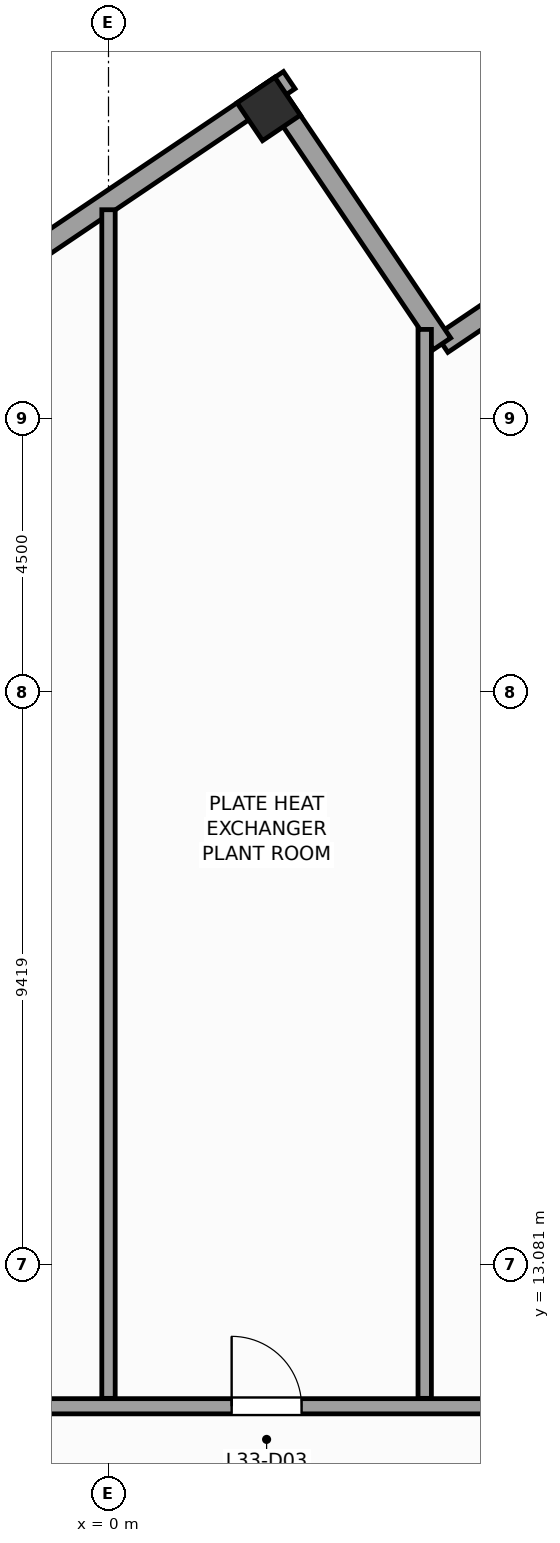
"""IFC4 building model, lengths in metres.
Left out: names, types, materials, properties, quantities, classifications, styles, units other than length and angle.
Written with IfcOpenShell. Run it as: python <this file> out.ifc"""

import sys

from ifc_helpers import new_model, si_unit, direction, frame, frame_2d, origin, origin_2d, place, context, subcontext, project, spatial, rectangle, extrude, source, transform, mapped, element, fill, save


model = new_model("IFC4")
c1 = context("Model", 3, precision=1e-05, world=origin(), true_north=direction((0.0, 1.0)))
c2 = subcontext(c1, "Body", "Model", "MODEL_VIEW")
j1 = project(units=[si_unit("LENGTHUNIT", "METRE"), si_unit("PLANEANGLEUNIT", "RADIAN")], contexts=[c1])
p1 = place(None, origin())
s1 = spatial("IfcSite", under=j1, at=p1, CompositionType="ELEMENT")
p2 = place(p1, origin())
s2 = spatial("IfcBuilding", under=s1, at=p2, CompositionType="ELEMENT")
p3 = place(p2, frame((0.0, 0.0, 139.2)))
s3 = spatial("IfcBuildingStorey", under=s2, at=p3, CompositionType="ELEMENT", Elevation=139.2)
m1 = source(origin(), c2, "Body", "SweptSolid", [
    extrude(rectangle(XDim=0.75, YDim=0.75, at=origin_2d()), origin(), (0.0, 0.0, 1.0), 5.2),
])
p4 = place(p3, frame((2.635, 32.083, 0.0), z_axis=(0.0, 0.0, 1.0), x_axis=(0.829037572555, 0.559192903471, 0.0)))
e1 = element("IfcColumn", 1, at=p4, inside=s3, PredefinedType="COLUMN", context=c2, shape_type="MappedRepresentation", body=[
    mapped(m1, transform((0.0, 0.0, 0.0), scale=1.0)),
])
p5 = place(p3, frame((9.631, 31.019, 0.0), z_axis=(0.0, 0.0, 1.0), x_axis=(-0.829025804298, -0.559210350234, 0.0)))
e2 = element("IfcWall", 2, at=p5, inside=s3, PredefinedType="STANDARD", context=c2, shape_type="SweptSolid", body=[
    extrude(rectangle(XDim=5.0, YDim=0.34, at=frame_2d((2.5, 0.0))), origin(), (0.0, 0.0, 1.0), 4.94),
])
p6 = place(p3, frame((5.486, 28.223, 0.0), z_axis=(0.0, 0.0, 1.0), x_axis=(-0.559171107879, 0.82905227345, 0.0)))
e3 = element("IfcWall", 3, at=p6, inside=s3, PredefinedType="STANDARD", context=c2, shape_type="SweptSolid", body=[
    extrude(rectangle(XDim=5.17, YDim=0.34, at=frame_2d((2.585, 0.0))), origin(), (0.0, 0.0, 1.0), 4.24),
])
p7 = place(p3, frame((2.972, 32.558, 0.0), z_axis=(0.0, 0.0, 1.0), x_axis=(-0.82903231094, -0.559200704056, 0.0)))
e4 = element("IfcWall", 4, at=p7, inside=s3, PredefinedType="STANDARD", context=c2, shape_type="SweptSolid", body=[
    extrude(rectangle(XDim=15.27, YDim=0.34, at=frame_2d((7.635, 0.0))), origin(), (0.0, 0.0, 1.0), 4.34),
])
p8 = place(p7, frame((12.27, 0.0, 0.0)))
e5 = element("IfcOpeningElement", 5, at=p8, cuts=e4, PredefinedType="OPENING", context=c2, shape_type="SweptSolid", body=[
    extrude(rectangle(XDim=1.2, YDim=2.3, at=frame_2d((0.6, 1.15))), frame((0.0, 0.18, 0.0), z_axis=(0.0, -1.0, 0.0), x_axis=(1.0, 0.0, 0.0)), (0.0, 0.0, 1.0), 0.36),
])
p9 = place(p3, frame((-10.75, 10.75, 0.0), z_axis=(0.0, 0.0, 1.0), x_axis=(1.0, 0.0, 0.0)))
e6 = element("IfcWall", 6, at=p9, inside=s3, PredefinedType="PARTITIONING", context=c2, shape_type="SweptSolid", body=[
    extrude(rectangle(XDim=21.5, YDim=0.25, at=frame_2d((10.75, 0.0))), origin(), (0.0, 0.0, 1.0), 4.94),
])
p10 = place(p9, frame((2.365, 0.0, 0.0)))
e7 = element("IfcOpeningElement", 7, at=p10, cuts=e6, PredefinedType="OPENING", context=c2, shape_type="SweptSolid", body=[
    extrude(rectangle(XDim=1.15, YDim=2.25, at=frame_2d((0.575, 1.125))), frame((0.0, 0.135, 0.0), z_axis=(0.0, -1.0, 0.0), x_axis=(1.0, 0.0, 0.0)), (0.0, 0.0, 1.0), 0.27),
])
p11 = place(p9, frame((7.575, 0.0, 0.0)))
e8 = element("IfcOpeningElement", 8, at=p11, cuts=e6, PredefinedType="OPENING", context=c2, shape_type="SweptSolid", body=[
    extrude(rectangle(XDim=1.15, YDim=2.25, at=frame_2d((0.575, 1.125))), frame((0.0, 0.135, 0.0), z_axis=(0.0, -1.0, 0.0), x_axis=(1.0, 0.0, 0.0)), (0.0, 0.0, 1.0), 0.27),
])
p12 = place(p9, frame((12.775, 0.0, 0.0)))
e9 = element("IfcOpeningElement", 9, at=p12, cuts=e6, PredefinedType="OPENING", context=c2, shape_type="SweptSolid", body=[
    extrude(rectangle(XDim=1.15, YDim=2.25, at=frame_2d((0.575, 1.125))), frame((0.0, 0.135, 0.0), z_axis=(0.0, -1.0, 0.0), x_axis=(1.0, 0.0, 0.0)), (0.0, 0.0, 1.0), 0.27),
])
p13 = place(p9, frame((17.986, 0.0, 0.0)))
e10 = element("IfcOpeningElement", 10, at=p13, cuts=e6, PredefinedType="OPENING", context=c2, shape_type="SweptSolid", body=[
    extrude(rectangle(XDim=1.15, YDim=2.25, at=frame_2d((0.575, 1.125))), frame((0.0, 0.135, 0.0), z_axis=(0.0, -1.0, 0.0), x_axis=(1.0, 0.0, 0.0)), (0.0, 0.0, 1.0), 0.27),
])
p14 = place(p3, frame((0.0, 10.88, 0.0), z_axis=(0.0, 0.0, 1.0), x_axis=(0.0, 1.0, 0.0)))
e11 = element("IfcWall", 11, at=p14, inside=s3, PredefinedType="PARTITIONING", context=c2, shape_type="SweptSolid", body=[
    extrude(rectangle(XDim=19.547, YDim=0.22, at=frame_2d((9.773, 0.0))), origin(), (0.0, 0.0, 1.0), 4.94),
])
p15 = place(p3, frame((5.2, 10.88, 0.0), z_axis=(0.0, 0.0, 1.0), x_axis=(0.0, 1.0, 0.0)))
e12 = element("IfcWall", 12, at=p15, inside=s3, PredefinedType="PARTITIONING", context=c2, shape_type="SweptSolid", body=[
    extrude(rectangle(XDim=17.579, YDim=0.22, at=frame_2d((8.79, 0.0))), origin(), (0.0, 0.0, 1.0), 4.94),
])
m2 = source(origin(), c2, "Body", "SweptSolid", [
    extrude(rectangle(XDim=1.15, YDim=2.25, at=frame_2d((0.575, 1.125))), frame((0.0, 0.025, 0.0), z_axis=(0.0, -1.0, 0.0), x_axis=(1.0, 0.0, 0.0)), (0.0, 0.0, 1.0), 0.05),
])
p16 = place(p12, origin())
e13 = element("IfcDoor", 13, at=p16, inside=s3, OperationType="SINGLE_SWING_LEFT", PredefinedType="DOOR", context=c2, shape_type="MappedRepresentation", body=[
    mapped(m2, transform((0.0, 0.0, 0.0), scale=1.0)),
])
fill(e9, e13)
save(model, sys.argv[1])
